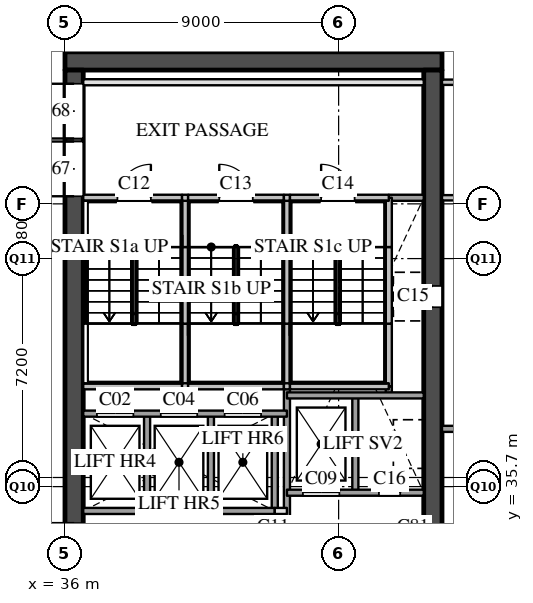
"""IFC4 building model, lengths in metres.
Left out: names, types, materials, properties, quantities, classifications, styles, units other than length and angle.
Written with IfcOpenShell. Run it as: python <this file> out.ifc"""

import sys

from ifc_helpers import new_model, si_unit, direction, frame, frame_2d, origin, place, context, subcontext, project, spatial, rectangle, extrude, element, fill, save


model = new_model("IFC4")
c1 = context("Model", 3, precision=1e-05, world=origin(), true_north=direction((0.0, 1.0)))
c2 = subcontext(c1, "Body", "Model", "MODEL_VIEW")
j1 = project(units=[si_unit("LENGTHUNIT", "METRE"), si_unit("PLANEANGLEUNIT", "RADIAN")], contexts=[c1])
p1 = place(None, origin())
s1 = spatial("IfcSite", under=j1, at=p1, CompositionType="ELEMENT")
p2 = place(p1, origin())
s2 = spatial("IfcBuilding", under=s1, at=p2, CompositionType="ELEMENT")
p3 = place(p2, origin())
s3 = spatial("IfcBuildingStorey", under=s2, at=p3, CompositionType="ELEMENT", Elevation=0.0)
p4 = place(p3, frame((36.0, 49.7, 0.0), z_axis=(0.0, 0.0, 1.0), x_axis=(1.0, 0.0, 0.0)))
e1 = element("IfcWall", 1, at=p4, inside=s3, PredefinedType="SHEAR", context=c2, shape_type="SweptSolid", body=[
    extrude(rectangle(XDim=12.4, YDim=0.6, at=frame_2d((6.2, 0.0))), origin(), (0.0, 0.0, 1.0), 7.59),
])
p5 = place(p3, frame((36.3, 29.1, 0.0), z_axis=(0.0, 0.0, 1.0), x_axis=(0.0, 1.0, 0.0)))
e2 = element("IfcWall", 2, at=p5, inside=s3, PredefinedType="SHEAR", context=c2, shape_type="SweptSolid", body=[
    extrude(rectangle(XDim=20.3, YDim=0.6, at=frame_2d((10.15, 0.0))), origin(), (0.0, 0.0, 1.0), 7.59),
])
p6 = place(p5, frame((3.6, 0.0, 0.0)))
e3 = element("IfcOpeningElement", 3, at=p6, cuts=e2, PredefinedType="OPENING", context=c2, shape_type="SweptSolid", body=[
    extrude(rectangle(XDim=1.8, YDim=2.1, at=frame_2d((0.9, 1.05))), frame((0.0, 0.31, 0.0), z_axis=(0.0, -1.0, 0.0), x_axis=(1.0, 0.0, 0.0)), (0.0, 0.0, 1.0), 0.62),
])
p7 = place(p5, frame((16.15, 0.0, 0.0)))
e4 = element("IfcOpeningElement", 4, at=p7, cuts=e2, PredefinedType="OPENING", context=c2, shape_type="SweptSolid", body=[
    extrude(rectangle(XDim=1.8, YDim=2.4, at=frame_2d((0.9, 1.2))), frame((0.0, 0.31, 0.0), z_axis=(0.0, -1.0, 0.0), x_axis=(1.0, 0.0, 0.0)), (0.0, 0.0, 1.0), 0.62),
])
p8 = place(p5, frame((18.05, 0.0, 0.0)))
e5 = element("IfcOpeningElement", 5, at=p8, cuts=e2, PredefinedType="OPENING", context=c2, shape_type="SweptSolid", body=[
    extrude(rectangle(XDim=1.8, YDim=2.4, at=frame_2d((0.9, 1.2))), frame((0.0, 0.31, 0.0), z_axis=(0.0, -1.0, 0.0), x_axis=(1.0, 0.0, 0.0)), (0.0, 0.0, 1.0), 0.62),
])
p9 = place(p3, frame((48.1, 29.1, 0.0), z_axis=(0.0, 0.0, 1.0), x_axis=(0.0, 1.0, 0.0)))
e6 = element("IfcWall", 6, at=p9, inside=s3, PredefinedType="SHEAR", context=c2, shape_type="SweptSolid", body=[
    extrude(rectangle(XDim=20.3, YDim=0.6, at=frame_2d((10.15, 0.0))), origin(), (0.0, 0.0, 1.0), 7.59),
])
p10 = place(p9, frame((12.5, 0.0, 0.0)))
e7 = element("IfcOpeningElement", 7, at=p10, cuts=e6, PredefinedType="OPENING", context=c2, shape_type="SweptSolid", body=[
    extrude(rectangle(XDim=0.7, YDim=2.1, at=frame_2d((0.35, 1.05))), frame((0.0, 0.31, 0.0), z_axis=(0.0, -1.0, 0.0), x_axis=(1.0, 0.0, 0.0)), (0.0, 0.0, 1.0), 0.62),
])
p11 = place(p9, frame((4.0, 0.0, 0.0)))
e8 = element("IfcOpeningElement", 8, at=p11, cuts=e6, PredefinedType="OPENING", context=c2, shape_type="SweptSolid", body=[
    extrude(rectangle(XDim=1.0, YDim=2.1, at=frame_2d((0.5, 1.05))), frame((0.0, 0.31, 0.0), z_axis=(0.0, -1.0, 0.0), x_axis=(1.0, 0.0, 0.0)), (0.0, 0.0, 1.0), 0.62),
])
p12 = place(p3, frame((38.7, 34.9, 0.0), z_axis=(0.0, 0.0, 1.0), x_axis=(0.0, 1.0, 0.0)))
e9 = element("IfcWall", 9, at=p12, inside=s3, PredefinedType="SOLIDWALL", context=c2, shape_type="SweptSolid", body=[
    extrude(rectangle(XDim=3.2, YDim=0.2, at=frame_2d((1.6, 0.0))), origin(), (0.0, 0.0, 1.0), 7.59),
])
p13 = place(p3, frame((39.95, 39.0, 0.0), z_axis=(0.0, 0.0, 1.0), x_axis=(0.0, 1.0, 0.0)))
e10 = element("IfcWall", 10, at=p13, inside=s3, PredefinedType="SOLIDWALL", context=c2, shape_type="SweptSolid", body=[
    extrude(rectangle(XDim=2.06, YDim=0.2, at=frame_2d((1.03, 0.0))), origin(), (0.0, 0.0, 1.0), 7.59),
])
p14 = place(p3, frame((39.95, 41.06, 0.0), z_axis=(0.0, 0.0, 1.0), x_axis=(0.0, 1.0, 0.0)))
e11 = element("IfcWall", 11, at=p14, inside=s3, PredefinedType="SOLIDWALL", context=c2, shape_type="SweptSolid", body=[
    extrude(rectangle(XDim=2.52, YDim=0.2, at=frame_2d((1.26, 0.0))), origin(), (0.0, 0.0, 1.0), 7.59),
])
p15 = place(p3, frame((39.95, 43.58, 0.0), z_axis=(0.0, 0.0, 1.0), x_axis=(0.0, 1.0, 0.0)))
e12 = element("IfcWall", 12, at=p15, inside=s3, PredefinedType="SOLIDWALL", context=c2, shape_type="SweptSolid", body=[
    extrude(rectangle(XDim=1.62, YDim=0.2, at=frame_2d((0.81, 0.0))), origin(), (0.0, 0.0, 1.0), 7.59),
])
for number, where, z_axis, x_axis in (
    (13, (40.8, 34.9, 0.0), (0.0, 0.0, 1.0), (0.0, 1.0, 0.0)),
    (14, (42.9, 34.9, 0.0), (0.0, 0.0, 1.0), (0.0, 1.0, 0.0)),
):
    element("IfcWall", number, at=place(p3, frame(where, z_axis=z_axis, x_axis=x_axis)), inside=s3, PredefinedType="SOLIDWALL", context=c2, shape_type="SweptSolid", body=[
        extrude(rectangle(XDim=3.2, YDim=0.2, at=frame_2d((1.6, 0.0))), origin(), (0.0, 0.0, 1.0), 7.59),
    ])
p16 = place(p3, frame((43.3, 29.1, 0.0), z_axis=(0.0, 0.0, 1.0), x_axis=(0.0, 1.0, 0.0)))
e15 = element("IfcWall", 15, at=p16, inside=s3, PredefinedType="SOLIDWALL", context=c2, shape_type="SweptSolid", body=[
    extrude(rectangle(XDim=9.9, YDim=0.2, at=frame_2d((4.95, 0.0))), origin(), (0.0, 0.0, 1.0), 7.59),
])
p17 = place(p16, frame((3.6, 0.0, 0.0)))
e16 = element("IfcOpeningElement", 16, at=p17, cuts=e15, PredefinedType="OPENING", context=c2, shape_type="SweptSolid", body=[
    extrude(rectangle(XDim=1.8, YDim=2.1, at=frame_2d((0.9, 1.05))), frame((0.0, 0.11, 0.0), z_axis=(0.0, -1.0, 0.0), x_axis=(1.0, 0.0, 0.0)), (0.0, 0.0, 1.0), 0.22),
])
p18 = place(p3, frame((43.3, 39.0, 0.0), z_axis=(0.0, 0.0, 1.0), x_axis=(0.0, 1.0, 0.0)))
e17 = element("IfcWall", 17, at=p18, inside=s3, PredefinedType="SOLIDWALL", context=c2, shape_type="SweptSolid", body=[
    extrude(rectangle(XDim=2.06, YDim=0.2, at=frame_2d((1.03, 0.0))), origin(), (0.0, 0.0, 1.0), 7.59),
])
p19 = place(p3, frame((43.3, 41.06, 0.0), z_axis=(0.0, 0.0, 1.0), x_axis=(0.0, 1.0, 0.0)))
e18 = element("IfcWall", 18, at=p19, inside=s3, PredefinedType="SOLIDWALL", context=c2, shape_type="SweptSolid", body=[
    extrude(rectangle(XDim=2.52, YDim=0.2, at=frame_2d((1.26, 0.0))), origin(), (0.0, 0.0, 1.0), 7.59),
])
p20 = place(p3, frame((43.3, 43.58, 0.0), z_axis=(0.0, 0.0, 1.0), x_axis=(0.0, 1.0, 0.0)))
e19 = element("IfcWall", 19, at=p20, inside=s3, PredefinedType="SOLIDWALL", context=c2, shape_type="SweptSolid", body=[
    extrude(rectangle(XDim=1.62, YDim=0.2, at=frame_2d((0.81, 0.0))), origin(), (0.0, 0.0, 1.0), 7.59),
])
p21 = place(p3, frame((45.55, 35.5, 0.0), z_axis=(0.0, 0.0, 1.0), x_axis=(0.0, 1.0, 0.0)))
e20 = element("IfcWall", 20, at=p21, inside=s3, PredefinedType="SOLIDWALL", context=c2, shape_type="SweptSolid", body=[
    extrude(rectangle(XDim=3.2, YDim=0.2, at=frame_2d((1.6, 0.0))), origin(), (0.0, 0.0, 1.0), 7.59),
])
p22 = place(p3, frame((46.65, 38.7, 0.0), z_axis=(0.0, 0.0, 1.0), x_axis=(0.0, 1.0, 0.0)))
e21 = element("IfcWall", 21, at=p22, inside=s3, PredefinedType="SOLIDWALL", context=c2, shape_type="SweptSolid", body=[
    extrude(rectangle(XDim=0.3, YDim=0.2, at=frame_2d((0.15, 0.0))), origin(), (0.0, 0.0, 1.0), 7.59),
])
p23 = place(p3, frame((46.65, 39.0, 0.0), z_axis=(0.0, 0.0, 1.0), x_axis=(0.0, 1.0, 0.0)))
e22 = element("IfcWall", 22, at=p23, inside=s3, PredefinedType="SOLIDWALL", context=c2, shape_type="SweptSolid", body=[
    extrude(rectangle(XDim=2.06, YDim=0.2, at=frame_2d((1.03, 0.0))), origin(), (0.0, 0.0, 1.0), 7.59),
])
p24 = place(p3, frame((46.65, 41.06, 0.0), z_axis=(0.0, 0.0, 1.0), x_axis=(0.0, 1.0, 0.0)))
e23 = element("IfcWall", 23, at=p24, inside=s3, PredefinedType="SOLIDWALL", context=c2, shape_type="SweptSolid", body=[
    extrude(rectangle(XDim=2.52, YDim=0.2, at=frame_2d((1.26, 0.0))), origin(), (0.0, 0.0, 1.0), 7.59),
])
p25 = place(p3, frame((46.65, 43.58, 0.0), z_axis=(0.0, 0.0, 1.0), x_axis=(0.0, 1.0, 0.0)))
e24 = element("IfcWall", 24, at=p25, inside=s3, PredefinedType="SOLIDWALL", context=c2, shape_type="SweptSolid", body=[
    extrude(rectangle(XDim=1.62, YDim=0.2, at=frame_2d((0.81, 0.0))), origin(), (0.0, 0.0, 1.0), 7.59),
])
p26 = place(p3, frame((42.9, 34.9, 0.0), z_axis=(0.0, 0.0, 1.0), x_axis=(1.0, 0.0, 0.0)))
e25 = element("IfcWall", 25, at=p26, inside=s3, PredefinedType="PARTITIONING", context=c2, shape_type="SweptSolid", body=[
    extrude(rectangle(XDim=0.4, YDim=0.2, at=frame_2d((0.2, 0.0))), origin(), (0.0, 0.0, 1.0), 7.59),
])
p27 = place(p3, frame((36.6, 34.9, 0.0), z_axis=(0.0, 0.0, 1.0), x_axis=(1.0, 0.0, 0.0)))
e26 = element("IfcWall", 26, at=p27, inside=s3, PredefinedType="SOLIDWALL", context=c2, shape_type="SweptSolid", body=[
    extrude(rectangle(XDim=6.3, YDim=0.2, at=frame_2d((3.15, 0.0))), origin(), (0.0, 0.0, 1.0), 7.59),
])
p28 = place(p3, frame((43.3, 35.5, 0.0), z_axis=(0.0, 0.0, 1.0), x_axis=(1.0, 0.0, 0.0)))
e27 = element("IfcWall", 27, at=p28, inside=s3, PredefinedType="SOLIDWALL", context=c2, shape_type="SweptSolid", body=[
    extrude(rectangle(XDim=4.5, YDim=0.2, at=frame_2d((2.25, 0.0))), origin(), (0.0, 0.0, 1.0), 7.59),
])
p29 = place(p28, frame((0.525, 0.0, 0.0)))
e28 = element("IfcOpeningElement", 28, at=p29, cuts=e27, PredefinedType="OPENING", context=c2, shape_type="SweptSolid", body=[
    extrude(rectangle(XDim=1.2, YDim=2.1, at=frame_2d((0.6, 1.05))), frame((0.0, 0.11, 0.0), z_axis=(0.0, -1.0, 0.0), x_axis=(1.0, 0.0, 0.0)), (0.0, 0.0, 1.0), 0.22),
])
p30 = place(p28, frame((3.025, 0.0, 0.0)))
e29 = element("IfcOpeningElement", 29, at=p30, cuts=e27, PredefinedType="OPENING", context=c2, shape_type="SweptSolid", body=[
    extrude(rectangle(XDim=0.7, YDim=2.1, at=frame_2d((0.35, 1.05))), frame((0.0, 0.11, 0.0), z_axis=(0.0, -1.0, 0.0), x_axis=(1.0, 0.0, 0.0)), (0.0, 0.0, 1.0), 0.22),
])
p31 = place(p3, frame((36.6, 38.1, 0.0), z_axis=(0.0, 0.0, 1.0), x_axis=(1.0, 0.0, 0.0)))
e30 = element("IfcWall", 30, at=p31, inside=s3, PredefinedType="SOLIDWALL", context=c2, shape_type="SweptSolid", body=[
    extrude(rectangle(XDim=6.7, YDim=0.2, at=frame_2d((3.35, 0.0))), origin(), (0.0, 0.0, 1.0), 7.59),
])
p32 = place(p31, frame((0.45, 0.0, 0.0)))
e31 = element("IfcOpeningElement", 31, at=p32, cuts=e30, PredefinedType="OPENING", context=c2, shape_type="SweptSolid", body=[
    extrude(rectangle(XDim=1.2, YDim=2.1, at=frame_2d((0.6, 1.05))), frame((0.0, 0.11, 0.0), z_axis=(0.0, -1.0, 0.0), x_axis=(1.0, 0.0, 0.0)), (0.0, 0.0, 1.0), 0.22),
])
p33 = place(p31, frame((2.55, 0.0, 0.0)))
e32 = element("IfcOpeningElement", 32, at=p33, cuts=e30, PredefinedType="OPENING", context=c2, shape_type="SweptSolid", body=[
    extrude(rectangle(XDim=1.2, YDim=2.1, at=frame_2d((0.6, 1.05))), frame((0.0, 0.11, 0.0), z_axis=(0.0, -1.0, 0.0), x_axis=(1.0, 0.0, 0.0)), (0.0, 0.0, 1.0), 0.22),
])
p34 = place(p31, frame((4.65, 0.0, 0.0)))
e33 = element("IfcOpeningElement", 33, at=p34, cuts=e30, PredefinedType="OPENING", context=c2, shape_type="SweptSolid", body=[
    extrude(rectangle(XDim=1.2, YDim=2.1, at=frame_2d((0.6, 1.05))), frame((0.0, 0.11, 0.0), z_axis=(0.0, -1.0, 0.0), x_axis=(1.0, 0.0, 0.0)), (0.0, 0.0, 1.0), 0.22),
])
p35 = place(p3, frame((43.3, 38.7, 0.0), z_axis=(0.0, 0.0, 1.0), x_axis=(1.0, 0.0, 0.0)))
e34 = element("IfcWall", 34, at=p35, inside=s3, PredefinedType="SOLIDWALL", context=c2, shape_type="SweptSolid", body=[
    extrude(rectangle(XDim=4.5, YDim=0.2, at=frame_2d((2.25, 0.0))), origin(), (0.0, 0.0, 1.0), 7.59),
])
p36 = place(p3, frame((36.6, 39.0, 0.0), z_axis=(0.0, 0.0, 1.0), x_axis=(1.0, 0.0, 0.0)))
e35 = element("IfcWall", 35, at=p36, inside=s3, PredefinedType="SOLIDWALL", context=c2, shape_type="SweptSolid", body=[
    extrude(rectangle(XDim=3.25, YDim=0.2, at=frame_2d((1.625, 0.0))), origin(), (0.0, 0.0, 1.0), 7.59),
])
p37 = place(p3, frame((39.85, 39.0, 0.0), z_axis=(0.0, 0.0, 1.0), x_axis=(1.0, 0.0, 0.0)))
e36 = element("IfcWall", 36, at=p37, inside=s3, PredefinedType="SOLIDWALL", context=c2, shape_type="SweptSolid", body=[
    extrude(rectangle(XDim=0.2, YDim=0.2, at=frame_2d((0.1, 0.0))), origin(), (0.0, 0.0, 1.0), 7.59),
])
p38 = place(p3, frame((40.05, 39.0, 0.0), z_axis=(0.0, 0.0, 1.0), x_axis=(1.0, 0.0, 0.0)))
e37 = element("IfcWall", 37, at=p38, inside=s3, PredefinedType="SOLIDWALL", context=c2, shape_type="SweptSolid", body=[
    extrude(rectangle(XDim=3.15, YDim=0.2, at=frame_2d((1.575, 0.0))), origin(), (0.0, 0.0, 1.0), 7.59),
])
p39 = place(p3, frame((43.2, 39.0, 0.0), z_axis=(0.0, 0.0, 1.0), x_axis=(1.0, 0.0, 0.0)))
e38 = element("IfcWall", 38, at=p39, inside=s3, PredefinedType="SOLIDWALL", context=c2, shape_type="SweptSolid", body=[
    extrude(rectangle(XDim=0.2, YDim=0.2, at=frame_2d((0.1, 0.0))), origin(), (0.0, 0.0, 1.0), 7.59),
])
p40 = place(p3, frame((43.4, 39.0, 0.0), z_axis=(0.0, 0.0, 1.0), x_axis=(1.0, 0.0, 0.0)))
e39 = element("IfcWall", 39, at=p40, inside=s3, PredefinedType="SOLIDWALL", context=c2, shape_type="SweptSolid", body=[
    extrude(rectangle(XDim=3.25, YDim=0.2, at=frame_2d((1.625, 0.0))), origin(), (0.0, 0.0, 1.0), 7.59),
])
p41 = place(p3, frame((46.65, 45.2, 0.0), z_axis=(0.0, 0.0, 1.0), x_axis=(1.0, 0.0, 0.0)))
e40 = element("IfcWall", 40, at=p41, inside=s3, PredefinedType="SOLIDWALL", context=c2, shape_type="SweptSolid", body=[
    extrude(rectangle(XDim=1.15, YDim=0.2, at=frame_2d((0.575, 0.0))), origin(), (0.0, 0.0, 1.0), 7.59),
])
p42 = place(p3, frame((36.6, 45.2, 0.0), z_axis=(0.0, 0.0, 1.0), x_axis=(1.0, 0.0, 0.0)))
e41 = element("IfcWall", 41, at=p42, inside=s3, PredefinedType="SOLIDWALL", context=c2, shape_type="SweptSolid", body=[
    extrude(rectangle(XDim=3.25, YDim=0.2, at=frame_2d((1.625, 0.0))), origin(), (0.0, 0.0, 1.0), 7.59),
])
p43 = place(p42, frame((1.125, 0.0, 0.0)))
e42 = element("IfcOpeningElement", 42, at=p43, cuts=e41, PredefinedType="OPENING", context=c2, shape_type="SweptSolid", body=[
    extrude(rectangle(XDim=1.1, YDim=2.1, at=frame_2d((0.55, 1.05))), frame((0.0, 0.11, 0.0), z_axis=(0.0, -1.0, 0.0), x_axis=(1.0, 0.0, 0.0)), (0.0, 0.0, 1.0), 0.22),
])
p44 = place(p3, frame((39.85, 45.2, 0.0), z_axis=(0.0, 0.0, 1.0), x_axis=(1.0, 0.0, 0.0)))
e43 = element("IfcWall", 43, at=p44, inside=s3, PredefinedType="SOLIDWALL", context=c2, shape_type="SweptSolid", body=[
    extrude(rectangle(XDim=0.2, YDim=0.2, at=frame_2d((0.1, 0.0))), origin(), (0.0, 0.0, 1.0), 7.59),
])
p45 = place(p3, frame((40.05, 45.2, 0.0), z_axis=(0.0, 0.0, 1.0), x_axis=(1.0, 0.0, 0.0)))
e44 = element("IfcWall", 44, at=p45, inside=s3, PredefinedType="SOLIDWALL", context=c2, shape_type="SweptSolid", body=[
    extrude(rectangle(XDim=3.15, YDim=0.2, at=frame_2d((1.575, 0.0))), origin(), (0.0, 0.0, 1.0), 7.59),
])
p46 = place(p45, frame((1.025, 0.0, 0.0)))
e45 = element("IfcOpeningElement", 45, at=p46, cuts=e44, PredefinedType="OPENING", context=c2, shape_type="SweptSolid", body=[
    extrude(rectangle(XDim=1.1, YDim=2.1, at=frame_2d((0.55, 1.05))), frame((0.0, 0.11, 0.0), z_axis=(0.0, -1.0, 0.0), x_axis=(1.0, 0.0, 0.0)), (0.0, 0.0, 1.0), 0.22),
])
p47 = place(p3, frame((43.2, 45.2, 0.0), z_axis=(0.0, 0.0, 1.0), x_axis=(1.0, 0.0, 0.0)))
e46 = element("IfcWall", 46, at=p47, inside=s3, PredefinedType="SOLIDWALL", context=c2, shape_type="SweptSolid", body=[
    extrude(rectangle(XDim=0.2, YDim=0.2, at=frame_2d((0.1, 0.0))), origin(), (0.0, 0.0, 1.0), 7.59),
])
p48 = place(p3, frame((43.4, 45.2, 0.0), z_axis=(0.0, 0.0, 1.0), x_axis=(1.0, 0.0, 0.0)))
e47 = element("IfcWall", 47, at=p48, inside=s3, PredefinedType="SOLIDWALL", context=c2, shape_type="SweptSolid", body=[
    extrude(rectangle(XDim=3.25, YDim=0.2, at=frame_2d((1.625, 0.0))), origin(), (0.0, 0.0, 1.0), 7.59),
])
p49 = place(p48, frame((1.025, 0.0, 0.0)))
e48 = element("IfcOpeningElement", 48, at=p49, cuts=e47, PredefinedType="OPENING", context=c2, shape_type="SweptSolid", body=[
    extrude(rectangle(XDim=1.1, YDim=2.1, at=frame_2d((0.55, 1.05))), frame((0.0, 0.11, 0.0), z_axis=(0.0, -1.0, 0.0), x_axis=(1.0, 0.0, 0.0)), (0.0, 0.0, 1.0), 0.22),
])
p50 = place(p3, frame((36.6, 49.0, 0.0), z_axis=(0.0, 0.0, 1.0), x_axis=(1.0, 0.0, 0.0)))
e49 = element("IfcWall", 49, at=p50, inside=s3, PredefinedType="PARTITIONING", context=c2, shape_type="SweptSolid", body=[
    extrude(rectangle(XDim=11.2, YDim=0.2, at=frame_2d((5.6, 0.0))), origin(), (0.0, 0.0, 1.0), 7.59),
])
p51 = place(p3, frame((48.4, 37.6, 0.0), z_axis=(0.0, 0.0, 1.0), x_axis=(1.0, 0.0, 0.0)))
e50 = element("IfcWall", 50, at=p51, inside=s3, PredefinedType="SOLIDWALL", context=c2, shape_type="SweptSolid", body=[
    extrude(rectangle(XDim=5.5, YDim=0.2, at=frame_2d((2.75, 0.0))), origin(), (0.0, 0.0, 1.0), 7.59),
])
p52 = place(p3, frame((48.4, 45.2, 0.0), z_axis=(0.0, 0.0, 1.0), x_axis=(1.0, 0.0, 0.0)))
e51 = element("IfcWall", 51, at=p52, inside=s3, PredefinedType="PARTITIONING", context=c2, shape_type="SweptSolid", body=[
    extrude(rectangle(XDim=5.6, YDim=0.175, at=frame_2d((2.8, 0.0))), origin(), (0.0, 0.0, 1.0), 7.59),
])
p53 = place(p52, frame((2.3, 0.0, 0.0)))
e52 = element("IfcOpeningElement", 52, at=p53, cuts=e51, PredefinedType="OPENING", context=c2, shape_type="SweptSolid", body=[
    extrude(rectangle(XDim=1.0, YDim=2.1, at=frame_2d((0.5, 1.05))), frame((0.0, 0.097, 0.0), z_axis=(0.0, -1.0, 0.0), x_axis=(1.0, 0.0, 0.0)), (0.0, 0.0, 1.0), 0.195),
])
p54 = place(p3, frame((48.4, 49.0, 0.0), z_axis=(0.0, 0.0, 1.0), x_axis=(1.0, 0.0, 0.0)))
e53 = element("IfcWall", 53, at=p54, inside=s3, PredefinedType="PARTITIONING", context=c2, shape_type="SweptSolid", body=[
    extrude(rectangle(XDim=5.6, YDim=0.175, at=frame_2d((2.8, 0.0))), origin(), (0.0, 0.0, 1.0), 6.59),
])
p55 = place(p54, frame((1.9, 0.0, 0.0)))
e54 = element("IfcOpeningElement", 54, at=p55, cuts=e53, PredefinedType="OPENING", context=c2, shape_type="SweptSolid", body=[
    extrude(rectangle(XDim=1.8, YDim=2.1, at=frame_2d((0.9, 1.05))), frame((0.0, 0.097, 0.0), z_axis=(0.0, -1.0, 0.0), x_axis=(1.0, 0.0, 0.0)), (0.0, 0.0, 1.0), 0.195),
])
p56 = place(p32, origin())
e55 = element("IfcDoor", 55, at=p56, inside=s3, OperationType="SLIDING_TO_LEFT", PredefinedType="DOOR", context=c2, shape_type="SweptSolid", body=[
    extrude(rectangle(XDim=1.2, YDim=2.1, at=frame_2d((0.6, 1.05))), frame((0.0, 0.025, 0.0), z_axis=(0.0, -1.0, 0.0), x_axis=(1.0, 0.0, 0.0)), (0.0, 0.0, 1.0), 0.05),
])
fill(e31, e55)
p57 = place(p33, origin())
e56 = element("IfcDoor", 56, at=p57, inside=s3, OperationType="SLIDING_TO_LEFT", PredefinedType="DOOR", context=c2, shape_type="SweptSolid", body=[
    extrude(rectangle(XDim=1.2, YDim=2.1, at=frame_2d((0.6, 1.05))), frame((0.0, 0.025, 0.0), z_axis=(0.0, -1.0, 0.0), x_axis=(1.0, 0.0, 0.0)), (0.0, 0.0, 1.0), 0.05),
])
fill(e32, e56)
p58 = place(p34, origin())
e57 = element("IfcDoor", 57, at=p58, inside=s3, OperationType="SLIDING_TO_LEFT", PredefinedType="DOOR", context=c2, shape_type="SweptSolid", body=[
    extrude(rectangle(XDim=1.2, YDim=2.1, at=frame_2d((0.6, 1.05))), frame((0.0, 0.025, 0.0), z_axis=(0.0, -1.0, 0.0), x_axis=(1.0, 0.0, 0.0)), (0.0, 0.0, 1.0), 0.05),
])
fill(e33, e57)
p59 = place(p29, origin())
e58 = element("IfcDoor", 58, at=p59, inside=s3, OperationType="SLIDING_TO_LEFT", PredefinedType="DOOR", context=c2, shape_type="SweptSolid", body=[
    extrude(rectangle(XDim=1.2, YDim=2.1, at=frame_2d((0.6, 1.05))), frame((0.0, 0.025, 0.0), z_axis=(0.0, -1.0, 0.0), x_axis=(1.0, 0.0, 0.0)), (0.0, 0.0, 1.0), 0.05),
])
fill(e28, e58)
p60 = place(p6, origin())
e59 = element("IfcDoor", 59, at=p60, inside=s3, OperationType="DOUBLE_DOOR_SINGLE_SWING", PredefinedType="DOOR", context=c2, shape_type="SweptSolid", body=[
    extrude(rectangle(XDim=1.8, YDim=2.1, at=frame_2d((0.9, 1.05))), frame((0.0, 0.025, 0.0), z_axis=(0.0, -1.0, 0.0), x_axis=(1.0, 0.0, 0.0)), (0.0, 0.0, 1.0), 0.05),
])
fill(e3, e59)
p61 = place(p17, origin())
e60 = element("IfcDoor", 60, at=p61, inside=s3, OperationType="DOUBLE_DOOR_SINGLE_SWING", PredefinedType="DOOR", context=c2, shape_type="SweptSolid", body=[
    extrude(rectangle(XDim=1.8, YDim=2.1, at=frame_2d((0.9, 1.05))), frame((0.0, 0.025, 0.0), z_axis=(0.0, -1.0, 0.0), x_axis=(1.0, 0.0, 0.0)), (0.0, 0.0, 1.0), 0.05),
])
fill(e16, e60)
p62 = place(p43, origin())
e61 = element("IfcDoor", 61, at=p62, inside=s3, OperationType="SINGLE_SWING_RIGHT", PredefinedType="DOOR", context=c2, shape_type="SweptSolid", body=[
    extrude(rectangle(XDim=1.1, YDim=2.1, at=frame_2d((0.55, 1.05))), frame((0.0, 0.025, 0.0), z_axis=(0.0, -1.0, 0.0), x_axis=(1.0, 0.0, 0.0)), (0.0, 0.0, 1.0), 0.05),
])
fill(e42, e61)
p63 = place(p46, origin())
e62 = element("IfcDoor", 62, at=p63, inside=s3, OperationType="SINGLE_SWING_LEFT", PredefinedType="DOOR", context=c2, shape_type="SweptSolid", body=[
    extrude(rectangle(XDim=1.1, YDim=2.1, at=frame_2d((0.55, 1.05))), frame((0.0, 0.025, 0.0), z_axis=(0.0, -1.0, 0.0), x_axis=(1.0, 0.0, 0.0)), (0.0, 0.0, 1.0), 0.05),
])
fill(e45, e62)
p64 = place(p49, origin())
e63 = element("IfcDoor", 63, at=p64, inside=s3, OperationType="SINGLE_SWING_LEFT", PredefinedType="DOOR", context=c2, shape_type="SweptSolid", body=[
    extrude(rectangle(XDim=1.1, YDim=2.1, at=frame_2d((0.55, 1.05))), frame((0.0, 0.025, 0.0), z_axis=(0.0, -1.0, 0.0), x_axis=(1.0, 0.0, 0.0)), (0.0, 0.0, 1.0), 0.05),
])
fill(e48, e63)
p65 = place(p10, origin())
e64 = element("IfcDoor", 64, at=p65, inside=s3, OperationType="SINGLE_SWING_RIGHT", PredefinedType="DOOR", context=c2, shape_type="SweptSolid", body=[
    extrude(rectangle(XDim=0.7, YDim=2.1, at=frame_2d((0.35, 1.05))), frame((0.0, 0.025, 0.0), z_axis=(0.0, -1.0, 0.0), x_axis=(1.0, 0.0, 0.0)), (0.0, 0.0, 1.0), 0.05),
])
fill(e7, e64)
p66 = place(p30, origin())
e65 = element("IfcDoor", 65, at=p66, inside=s3, OperationType="SINGLE_SWING_RIGHT", PredefinedType="DOOR", context=c2, shape_type="SweptSolid", body=[
    extrude(rectangle(XDim=0.7, YDim=2.1, at=frame_2d((0.35, 1.05))), frame((0.0, 0.025, 0.0), z_axis=(0.0, -1.0, 0.0), x_axis=(1.0, 0.0, 0.0)), (0.0, 0.0, 1.0), 0.05),
])
fill(e29, e65)
p67 = place(p7, origin())
e66 = element("IfcDoor", 66, at=p67, inside=s3, OperationType="DOUBLE_DOOR_SINGLE_SWING", PredefinedType="DOOR", context=c2, shape_type="SweptSolid", body=[
    extrude(rectangle(XDim=1.8, YDim=2.4, at=frame_2d((0.9, 1.2))), frame((0.0, 0.025, 0.0), z_axis=(0.0, -1.0, 0.0), x_axis=(1.0, 0.0, 0.0)), (0.0, 0.0, 1.0), 0.05),
])
fill(e4, e66)
p68 = place(p8, origin())
e67 = element("IfcDoor", 67, at=p68, inside=s3, OperationType="DOUBLE_DOOR_SINGLE_SWING", PredefinedType="DOOR", context=c2, shape_type="SweptSolid", body=[
    extrude(rectangle(XDim=1.8, YDim=2.4, at=frame_2d((0.9, 1.2))), frame((0.0, 0.025, 0.0), z_axis=(0.0, -1.0, 0.0), x_axis=(1.0, 0.0, 0.0)), (0.0, 0.0, 1.0), 0.05),
])
fill(e5, e67)
save(model, sys.argv[1])
